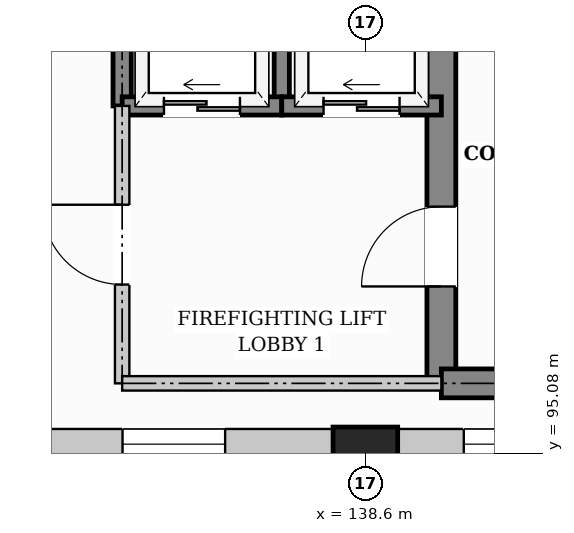
"""IFC4 building model, lengths in metres.
Left out: names, types, materials, properties, quantities, classifications, styles, units other than length and angle.
Written with IfcOpenShell. Run it as: python <this file> out.ifc"""

import sys

from ifc_helpers import new_model, si_unit, direction, frame, frame_2d, origin, origin_2d, place, context, subcontext, project, spatial, rectangle, extrude, element, fill, save


model = new_model("IFC4")
c1 = context("Model", 3, precision=1e-05, world=origin(), true_north=direction((0.0, 1.0)))
c2 = subcontext(c1, "Body", "Model", "MODEL_VIEW")
j1 = project(units=[si_unit("LENGTHUNIT", "METRE"), si_unit("PLANEANGLEUNIT", "RADIAN")], contexts=[c1])
p1 = place(None, origin())
s1 = spatial("IfcSite", under=j1, at=p1, CompositionType="ELEMENT")
p2 = place(p1, origin())
s2 = spatial("IfcBuilding", under=s1, at=p2, CompositionType="ELEMENT")
p3 = place(p2, frame((0.0, 0.0, 5.1)))
s3 = spatial("IfcBuildingStorey", under=s2, at=p3, CompositionType="ELEMENT", Elevation=5.1)
p4 = place(p3, frame((138.6, 95.0, 0.0), z_axis=(0.0, 0.0, 1.0), x_axis=(1.0, 0.0, 0.0)))
e1 = element("IfcColumn", 1, at=p4, inside=s3, PredefinedType="COLUMN", context=c2, shape_type="SweptSolid", body=[
    extrude(rectangle(XDim=0.85, YDim=0.85, at=origin_2d()), origin(), (0.0, 0.0, 1.0), 4.5),
])
p5 = place(p3, frame((147.6, 95.2, 0.0), z_axis=(0.0, 0.0, 1.0), x_axis=(-1.0, 0.0, 0.0)))
e2 = element("IfcWall", 2, at=p5, inside=s3, PredefinedType="SOLIDWALL", context=c2, shape_type="SweptSolid", body=[
    extrude(rectangle(XDim=9.0, YDim=0.4, at=frame_2d((4.5, 0.0))), origin(), (0.0, 0.0, 1.0), 3.5),
])
p6 = place(p5, frame((1.295, 0.0, 0.85)))
e3 = element("IfcOpeningElement", 3, at=p6, cuts=e2, PredefinedType="OPENING", context=c2, shape_type="SweptSolid", body=[
    extrude(rectangle(XDim=2.45, YDim=2.05, at=frame_2d((1.225, 1.025))), frame((0.0, 0.21, 0.0), z_axis=(0.0, -1.0, 0.0), x_axis=(1.0, 0.0, 0.0)), (0.0, 0.0, 1.0), 0.42),
])
p7 = place(p5, frame((5.255, 0.0, 0.85)))
e4 = element("IfcOpeningElement", 4, at=p7, cuts=e2, PredefinedType="OPENING", context=c2, shape_type="SweptSolid", body=[
    extrude(rectangle(XDim=2.45, YDim=2.05, at=frame_2d((1.225, 1.025))), frame((0.0, 0.21, 0.0), z_axis=(0.0, -1.0, 0.0), x_axis=(1.0, 0.0, 0.0)), (0.0, 0.0, 1.0), 0.42),
])
p8 = place(p3, frame((138.6, 95.2, 0.0), z_axis=(0.0, 0.0, 1.0), x_axis=(-1.0, 0.0, 0.0)))
e5 = element("IfcWall", 5, at=p8, inside=s3, PredefinedType="SOLIDWALL", context=c2, shape_type="SweptSolid", body=[
    extrude(rectangle(XDim=9.0, YDim=0.4, at=frame_2d((4.5, 0.0))), origin(), (0.0, 0.0, 1.0), 3.47),
])
p9 = place(p8, frame((1.845, 0.0, 0.85)))
e6 = element("IfcOpeningElement", 6, at=p9, cuts=e5, PredefinedType="OPENING", context=c2, shape_type="SweptSolid", body=[
    extrude(rectangle(XDim=1.35, YDim=2.35, at=frame_2d((0.675, 1.175))), frame((0.0, 0.21, 0.0), z_axis=(0.0, -1.0, 0.0), x_axis=(1.0, 0.0, 0.0)), (0.0, 0.0, 1.0), 0.42),
])
p10 = place(p8, frame((5.805, 0.0, 0.85)))
e7 = element("IfcOpeningElement", 7, at=p10, cuts=e5, PredefinedType="OPENING", context=c2, shape_type="SweptSolid", body=[
    extrude(rectangle(XDim=1.35, YDim=2.35, at=frame_2d((0.675, 1.175))), frame((0.0, 0.21, 0.0), z_axis=(0.0, -1.0, 0.0), x_axis=(1.0, 0.0, 0.0)), (0.0, 0.0, 1.0), 0.42),
])
p11 = place(p3, frame((139.6, 96.0, 0.0), z_axis=(0.0, 0.0, 1.0), x_axis=(0.0, 1.0, 0.0)))
e8 = element("IfcWall", 8, at=p11, inside=s3, PredefinedType="SHEAR", context=c2, shape_type="SweptSolid", body=[
    extrude(rectangle(XDim=6.0, YDim=0.38, at=frame_2d((3.0, 0.0))), origin(), (0.0, 0.0, 1.0), 4.22),
])
p12 = place(p11, frame((1.275, 0.0, 0.0)))
e9 = element("IfcOpeningElement", 9, at=p12, cuts=e8, PredefinedType="OPENING", context=c2, shape_type="SweptSolid", body=[
    extrude(rectangle(XDim=1.05, YDim=2.15, at=frame_2d((0.525, 1.075))), frame((0.0, 0.2, 0.0), z_axis=(0.0, -1.0, 0.0), x_axis=(1.0, 0.0, 0.0)), (0.0, 0.0, 1.0), 0.4),
])
p13 = place(p3, frame((139.6, 96.0, 0.0), z_axis=(0.0, 0.0, 1.0), x_axis=(1.0, 0.0, 0.0)))
e10 = element("IfcWall", 10, at=p13, inside=s3, PredefinedType="SHEAR", context=c2, shape_type="SweptSolid", body=[
    extrude(rectangle(XDim=7.0, YDim=0.38, at=frame_2d((3.5, 0.0))), origin(), (0.0, 0.0, 1.0), 4.22),
])
p14 = place(p3, frame((135.4, 99.65, 0.0), z_axis=(0.0, 0.0, 1.0), x_axis=(0.0, 1.0, 0.0)))
e11 = element("IfcWall", 11, at=p14, inside=s3, PredefinedType="SHEAR", context=c2, shape_type="SweptSolid", body=[
    extrude(rectangle(XDim=2.35, YDim=0.24, at=frame_2d((1.175, 0.0))), origin(), (0.0, 0.0, 1.0), 4.22),
])
p15 = place(p3, frame((137.5, 99.65, 0.0), z_axis=(0.0, 0.0, 1.0), x_axis=(0.0, 1.0, 0.0)))
e12 = element("IfcWall", 12, at=p15, inside=s3, PredefinedType="SHEAR", context=c2, shape_type="SweptSolid", body=[
    extrude(rectangle(XDim=2.35, YDim=0.2, at=frame_2d((1.175, 0.0))), origin(), (0.0, 0.0, 1.0), 4.22),
])
p16 = place(p3, frame((135.4, 99.65, 0.0), z_axis=(0.0, 0.0, 1.0), x_axis=(1.0, 0.0, 0.0)))
e13 = element("IfcWall", 13, at=p16, inside=s3, PredefinedType="SHEAR", context=c2, shape_type="SweptSolid", body=[
    extrude(rectangle(XDim=2.1, YDim=0.24, at=frame_2d((1.05, 0.0))), origin(), (0.0, 0.0, 1.0), 4.22),
])
p17 = place(p16, frame((0.55, 0.0, 0.0)))
e14 = element("IfcOpeningElement", 14, at=p17, cuts=e13, PredefinedType="OPENING", context=c2, shape_type="SweptSolid", body=[
    extrude(rectangle(XDim=1.0, YDim=2.1, at=frame_2d((0.5, 1.05))), frame((0.0, 0.13, 0.0), z_axis=(0.0, -1.0, 0.0), x_axis=(1.0, 0.0, 0.0)), (0.0, 0.0, 1.0), 0.26),
])
p18 = place(p3, frame((137.5, 99.65, 0.0), z_axis=(0.0, 0.0, 1.0), x_axis=(1.0, 0.0, 0.0)))
e15 = element("IfcWall", 15, at=p18, inside=s3, PredefinedType="SHEAR", context=c2, shape_type="SweptSolid", body=[
    extrude(rectangle(XDim=2.1, YDim=0.24, at=frame_2d((1.05, 0.0))), origin(), (0.0, 0.0, 1.0), 4.22),
])
p19 = place(p18, frame((0.55, 0.0, 0.0)))
e16 = element("IfcOpeningElement", 16, at=p19, cuts=e15, PredefinedType="OPENING", context=c2, shape_type="SweptSolid", body=[
    extrude(rectangle(XDim=1.0, YDim=2.1, at=frame_2d((0.5, 1.05))), frame((0.0, 0.13, 0.0), z_axis=(0.0, -1.0, 0.0), x_axis=(1.0, 0.0, 0.0)), (0.0, 0.0, 1.0), 0.26),
])
p20 = place(p3, frame((135.4, 96.0, 0.0), z_axis=(0.0, 0.0, 1.0), x_axis=(0.0, 1.0, 0.0)))
e17 = element("IfcWall", 17, at=p20, inside=s3, PredefinedType="PARTITIONING", context=c2, shape_type="SweptSolid", body=[
    extrude(rectangle(XDim=3.65, YDim=0.19, at=frame_2d((1.825, 0.0))), origin(), (0.0, 0.0, 1.0), 4.22),
])
p21 = place(p20, frame((1.3, 0.0, 0.0)))
e18 = element("IfcOpeningElement", 18, at=p21, cuts=e17, PredefinedType="OPENING", context=c2, shape_type="SweptSolid", body=[
    extrude(rectangle(XDim=1.05, YDim=2.15, at=frame_2d((0.525, 1.075))), frame((0.0, 0.105, 0.0), z_axis=(0.0, -1.0, 0.0), x_axis=(1.0, 0.0, 0.0)), (0.0, 0.0, 1.0), 0.21),
])
p22 = place(p3, frame((135.4, 96.0, 0.0), z_axis=(0.0, 0.0, 1.0), x_axis=(1.0, 0.0, 0.0)))
e19 = element("IfcWall", 19, at=p22, inside=s3, PredefinedType="PARTITIONING", context=c2, shape_type="SweptSolid", body=[
    extrude(rectangle(XDim=4.2, YDim=0.19, at=frame_2d((2.1, 0.0))), origin(), (0.0, 0.0, 1.0), 4.22),
])
p23 = place(p7, origin())
e20 = element("IfcWindow", 20, at=p23, inside=s3, PartitioningType="TRIPLE_PANEL_VERTICAL", PredefinedType="WINDOW", context=c2, shape_type="SweptSolid", body=[
    extrude(rectangle(XDim=2.45, YDim=2.05, at=frame_2d((1.225, 1.025))), frame((0.0, 0.03, 0.0), z_axis=(0.0, -1.0, 0.0), x_axis=(1.0, 0.0, 0.0)), (0.0, 0.0, 1.0), 0.06),
])
fill(e4, e20)
p24 = place(p9, origin())
e21 = element("IfcWindow", 21, at=p24, inside=s3, PartitioningType="SINGLE_PANEL", PredefinedType="WINDOW", context=c2, shape_type="SweptSolid", body=[
    extrude(rectangle(XDim=1.35, YDim=2.35, at=frame_2d((0.675, 1.175))), frame((0.0, 0.03, 0.0), z_axis=(0.0, -1.0, 0.0), x_axis=(1.0, 0.0, 0.0)), (0.0, 0.0, 1.0), 0.06),
])
fill(e6, e21)
p25 = place(p12, origin())
e22 = element("IfcDoor", 22, at=p25, inside=s3, OperationType="SINGLE_SWING_LEFT", PredefinedType="DOOR", context=c2, shape_type="SweptSolid", body=[
    extrude(rectangle(XDim=1.05, YDim=2.15, at=frame_2d((0.525, 1.075))), frame((0.0, 0.025, 0.0), z_axis=(0.0, -1.0, 0.0), x_axis=(1.0, 0.0, 0.0)), (0.0, 0.0, 1.0), 0.05),
])
fill(e9, e22)
p26 = place(p17, origin())
e23 = element("IfcDoor", 23, at=p26, inside=s3, OperationType="SLIDING_TO_LEFT", PredefinedType="DOOR", context=c2, shape_type="SweptSolid", body=[
    extrude(rectangle(XDim=1.0, YDim=2.1, at=frame_2d((0.5, 1.05))), frame((0.0, 0.025, 0.0), z_axis=(0.0, -1.0, 0.0), x_axis=(1.0, 0.0, 0.0)), (0.0, 0.0, 1.0), 0.05),
])
fill(e14, e23)
p27 = place(p19, origin())
e24 = element("IfcDoor", 24, at=p27, inside=s3, OperationType="SLIDING_TO_LEFT", PredefinedType="DOOR", context=c2, shape_type="SweptSolid", body=[
    extrude(rectangle(XDim=1.0, YDim=2.1, at=frame_2d((0.5, 1.05))), frame((0.0, 0.025, 0.0), z_axis=(0.0, -1.0, 0.0), x_axis=(1.0, 0.0, 0.0)), (0.0, 0.0, 1.0), 0.05),
])
fill(e16, e24)
p28 = place(p21, origin())
e25 = element("IfcDoor", 25, at=p28, inside=s3, OperationType="SINGLE_SWING_RIGHT", PredefinedType="DOOR", context=c2, shape_type="SweptSolid", body=[
    extrude(rectangle(XDim=1.05, YDim=2.15, at=frame_2d((0.525, 1.075))), frame((0.0, 0.025, 0.0), z_axis=(0.0, -1.0, 0.0), x_axis=(1.0, 0.0, 0.0)), (0.0, 0.0, 1.0), 0.05),
])
fill(e18, e25)
save(model, sys.argv[1])
